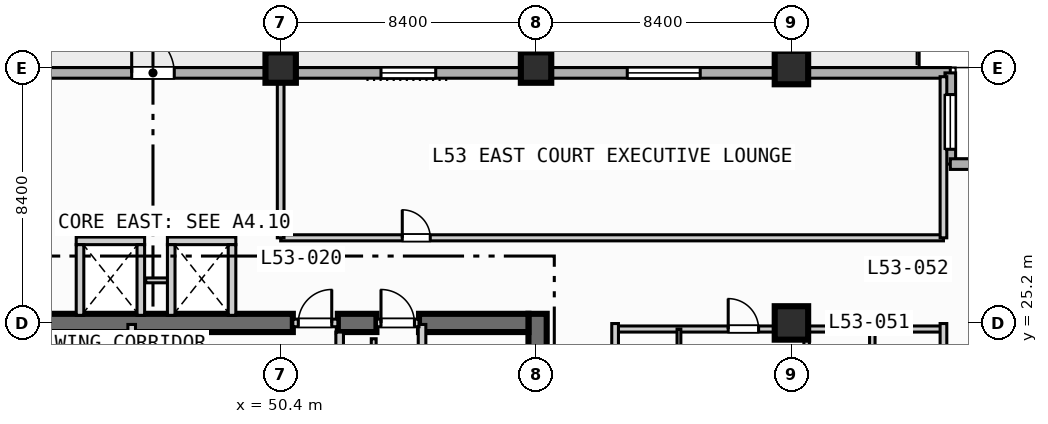
"""IFC4 building model, lengths in metres.
Left out: names, types, materials, properties, quantities, classifications, styles, units other than length and angle.
Written with IfcOpenShell. Run it as: python <this file> out.ifc"""

import sys

from ifc_helpers import new_model, si_unit, direction, frame, frame_2d, origin, origin_2d, place, context, subcontext, project, spatial, rectangle, extrude, element, fill, save


model = new_model("IFC4")
c1 = context("Model", 3, precision=1e-05, world=origin(), true_north=direction((0.0, 1.0)))
c2 = subcontext(c1, "Body", "Model", "MODEL_VIEW")
j1 = project(units=[si_unit("LENGTHUNIT", "METRE"), si_unit("PLANEANGLEUNIT", "RADIAN")], contexts=[c1])
p1 = place(None, origin())
s1 = spatial("IfcSite", under=j1, at=p1, CompositionType="ELEMENT")
p2 = place(p1, origin())
s2 = spatial("IfcBuilding", under=s1, at=p2, CompositionType="ELEMENT")
p3 = place(p2, frame((0.0, 0.0, 216.1)))
s3 = spatial("IfcBuildingStorey", under=s2, at=p3, CompositionType="ELEMENT", Elevation=216.1)
p4 = place(p3, frame((58.85, 20.5, 0.0), z_axis=(0.0, 0.0, 1.0), x_axis=(0.0, 1.0, 0.0)))
e1 = element("IfcWall", 1, at=p4, inside=s3, PredefinedType="SHEAR", context=c2, shape_type="SweptSolid", body=[
    extrude(rectangle(XDim=5.0, YDim=0.6, at=frame_2d((2.5, 0.0))), origin(), (0.0, 0.0, 1.0), 3.47),
])
p5 = place(p3, frame((42.2, 25.2, 0.0), z_axis=(0.0, 0.0, 1.0), x_axis=(1.0, 0.0, 0.0)))
e2 = element("IfcWall", 2, at=p5, inside=s3, PredefinedType="SHEAR", context=c2, shape_type="SweptSolid", body=[
    extrude(rectangle(XDim=8.6, YDim=0.6, at=frame_2d((4.3, 0.0))), origin(), (0.0, 0.0, 1.0), 3.47),
])
p6 = place(p3, frame((52.28, 25.2, 0.0), z_axis=(0.0, 0.0, 1.0), x_axis=(1.0, 0.0, 0.0)))
e3 = element("IfcWall", 3, at=p6, inside=s3, PredefinedType="SHEAR", context=c2, shape_type="SweptSolid", body=[
    extrude(rectangle(XDim=1.27, YDim=0.6, at=frame_2d((0.635, 0.0))), origin(), (0.0, 0.0, 1.0), 3.47),
])
p7 = place(p3, frame((54.95, 25.2, 0.0), z_axis=(0.0, 0.0, 1.0), x_axis=(1.0, 0.0, 0.0)))
e4 = element("IfcWall", 4, at=p7, inside=s3, PredefinedType="SHEAR", context=c2, shape_type="SweptSolid", body=[
    extrude(rectangle(XDim=3.6, YDim=0.6, at=frame_2d((1.8, 0.0))), origin(), (0.0, 0.0, 1.0), 3.47),
])
for number, where, z_axis, x_axis in (
    (5, (50.4, 33.6, 0.0), (0.0, 0.0, 1.0), (1.0, 0.0, 0.0)),
    (6, (58.8, 33.6, 0.0), (0.0, 0.0, 1.0), (1.0, 0.0, 0.0)),
):
    element("IfcColumn", number, at=place(p3, frame(where, z_axis=z_axis, x_axis=x_axis)), inside=s3, PredefinedType="COLUMN", context=c2, shape_type="SweptSolid", body=[
        extrude(rectangle(XDim=1.0, YDim=1.0, at=origin_2d()), origin(), (0.0, 0.0, 1.0), 3.7),
    ])
for number, where, z_axis, x_axis in (
    (7, (67.2, 25.2, 0.0), (0.0, 0.0, 1.0), (1.0, 0.0, 0.0)),
    (8, (67.2, 33.6, 0.0), (0.0, 0.0, 1.0), (1.0, 0.0, 0.0)),
):
    element("IfcColumn", number, at=place(p3, frame(where, z_axis=z_axis, x_axis=x_axis)), inside=s3, PredefinedType="COLUMN", context=c2, shape_type="SweptSolid", body=[
        extrude(rectangle(XDim=1.1, YDim=1.1, at=origin_2d()), origin(), (0.0, 0.0, 1.0), 3.7),
    ])
p8 = place(p3, frame((33.425, 33.425, 0.0), z_axis=(0.0, 0.0, 1.0), x_axis=(1.0, 0.0, 0.0)))
e9 = element("IfcWall", 9, at=p8, inside=s3, PredefinedType="STANDARD", context=c2, shape_type="SweptSolid", body=[
    extrude(rectangle(XDim=39.0, YDim=0.35, at=frame_2d((19.5, 0.0))), origin(), (0.0, 0.0, 1.0), 3.47),
])
p9 = place(p8, frame((12.075, 0.0, 0.0)))
e10 = element("IfcOpeningElement", 10, at=p9, cuts=e9, PredefinedType="OPENING", context=c2, shape_type="SweptSolid", body=[
    extrude(rectangle(XDim=1.4, YDim=2.2, at=frame_2d((0.7, 1.1))), frame((0.0, 0.185, 0.0), z_axis=(0.0, -1.0, 0.0), x_axis=(1.0, 0.0, 0.0)), (0.0, 0.0, 1.0), 0.37),
])
p10 = place(p8, frame((20.275, 0.0, 0.85)))
e11 = element("IfcOpeningElement", 11, at=p10, cuts=e9, PredefinedType="OPENING", context=c2, shape_type="SweptSolid", body=[
    extrude(rectangle(XDim=1.8, YDim=1.8, at=frame_2d((0.9, 0.9))), frame((0.0, 0.185, 0.0), z_axis=(0.0, -1.0, 0.0), x_axis=(1.0, 0.0, 0.0)), (0.0, 0.0, 1.0), 0.37),
])
p11 = place(p8, frame((28.375, 0.0, 0.85)))
e12 = element("IfcOpeningElement", 12, at=p11, cuts=e9, PredefinedType="OPENING", context=c2, shape_type="SweptSolid", body=[
    extrude(rectangle(XDim=2.4, YDim=1.95, at=frame_2d((1.2, 0.975))), frame((0.0, 0.185, 0.0), z_axis=(0.0, -1.0, 0.0), x_axis=(1.0, 0.0, 0.0)), (0.0, 0.0, 1.0), 0.37),
])
p12 = place(p3, frame((72.425, 33.425, 0.0), z_axis=(0.0, 0.0, 1.0), x_axis=(0.0, -1.0, 0.0)))
e13 = element("IfcWall", 13, at=p12, inside=s3, PredefinedType="STANDARD", context=c2, shape_type="SweptSolid", body=[
    extrude(rectangle(XDim=3.0, YDim=0.35, at=frame_2d((1.5, 0.0))), origin(), (0.0, 0.0, 1.0), 3.47),
])
p13 = place(p12, frame((0.712, 0.0, 0.85)))
e14 = element("IfcOpeningElement", 14, at=p13, cuts=e13, PredefinedType="OPENING", context=c2, shape_type="SweptSolid", body=[
    extrude(rectangle(XDim=1.8, YDim=1.8, at=frame_2d((0.9, 0.9))), frame((0.0, 0.185, 0.0), z_axis=(0.0, -1.0, 0.0), x_axis=(1.0, 0.0, 0.0)), (0.0, 0.0, 1.0), 0.37),
])
p14 = place(p3, frame((72.425, 30.425, 0.0), z_axis=(0.0, 0.0, 1.0), x_axis=(1.0, 0.0, 0.0)))
e15 = element("IfcWall", 15, at=p14, inside=s3, PredefinedType="STANDARD", context=c2, shape_type="SweptSolid", body=[
    extrude(rectangle(XDim=3.0, YDim=0.35, at=frame_2d((1.5, 0.0))), origin(), (0.0, 0.0, 1.0), 3.47),
])
p15 = place(p3, frame((45.5, 21.0, 0.0), z_axis=(0.0, 0.0, 1.0), x_axis=(0.0, 1.0, 0.0)))
e16 = element("IfcWall", 16, at=p15, inside=s3, PredefinedType="SOLIDWALL", context=c2, shape_type="SweptSolid", body=[
    extrude(rectangle(XDim=4.15, YDim=0.25, at=frame_2d((2.075, 0.0))), origin(), (0.0, 0.0, 1.0), 3.47),
])
p16 = place(p15, frame((0.65, 0.0, 0.0)))
e17 = element("IfcOpeningElement", 17, at=p16, cuts=e16, PredefinedType="OPENING", context=c2, shape_type="SweptSolid", body=[
    extrude(rectangle(XDim=1.1, YDim=2.15, at=frame_2d((0.55, 1.075))), frame((0.0, 0.135, 0.0), z_axis=(0.0, -1.0, 0.0), x_axis=(1.0, 0.0, 0.0)), (0.0, 0.0, 1.0), 0.27),
])
p17 = place(p3, frame((50.8, 25.2, 0.0), z_axis=(0.0, 0.0, 1.0), x_axis=(1.0, 0.0, 0.0)))
e18 = element("IfcWall", 18, at=p17, inside=s3, PredefinedType="SOLIDWALL", context=c2, shape_type="SweptSolid", body=[
    extrude(rectangle(XDim=1.48, YDim=0.25, at=frame_2d((0.74, 0.0))), origin(), (0.0, 0.0, 1.0), 3.47),
])
p18 = place(p17, frame((0.18, 0.0, 0.0)))
e19 = element("IfcOpeningElement", 19, at=p18, cuts=e18, PredefinedType="OPENING", context=c2, shape_type="SweptSolid", body=[
    extrude(rectangle(XDim=1.1, YDim=2.15, at=frame_2d((0.55, 1.075))), frame((0.0, 0.135, 0.0), z_axis=(0.0, -1.0, 0.0), x_axis=(1.0, 0.0, 0.0)), (0.0, 0.0, 1.0), 0.27),
])
p19 = place(p3, frame((52.34, 21.0, 0.0), z_axis=(0.0, 0.0, 1.0), x_axis=(0.0, 1.0, 0.0)))
e20 = element("IfcWall", 20, at=p19, inside=s3, PredefinedType="SOLIDWALL", context=c2, shape_type="SweptSolid", body=[
    extrude(rectangle(XDim=3.9, YDim=0.25, at=frame_2d((1.95, 0.0))), origin(), (0.0, 0.0, 1.0), 3.47),
])
p20 = place(p3, frame((55.05, 21.0, 0.0), z_axis=(0.0, 0.0, 1.0), x_axis=(0.0, 1.0, 0.0)))
e21 = element("IfcWall", 21, at=p20, inside=s3, PredefinedType="SOLIDWALL", context=c2, shape_type="SweptSolid", body=[
    extrude(rectangle(XDim=4.15, YDim=0.25, at=frame_2d((2.075, 0.0))), origin(), (0.0, 0.0, 1.0), 3.47),
])
p21 = place(p20, frame((1.85, 0.0, 0.0)))
e22 = element("IfcOpeningElement", 22, at=p21, cuts=e21, PredefinedType="OPENING", context=c2, shape_type="SweptSolid", body=[
    extrude(rectangle(XDim=1.1, YDim=2.15, at=frame_2d((0.55, 1.075))), frame((0.0, 0.135, 0.0), z_axis=(0.0, -1.0, 0.0), x_axis=(1.0, 0.0, 0.0)), (0.0, 0.0, 1.0), 0.27),
])
p22 = place(p3, frame((53.55, 25.2, 0.0), z_axis=(0.0, 0.0, 1.0), x_axis=(1.0, 0.0, 0.0)))
e23 = element("IfcWall", 23, at=p22, inside=s3, PredefinedType="SOLIDWALL", context=c2, shape_type="SweptSolid", body=[
    extrude(rectangle(XDim=1.4, YDim=0.25, at=frame_2d((0.7, 0.0))), origin(), (0.0, 0.0, 1.0), 3.47),
])
p23 = place(p22, frame((0.15, 0.0, 0.0)))
e24 = element("IfcOpeningElement", 24, at=p23, cuts=e23, PredefinedType="OPENING", context=c2, shape_type="SweptSolid", body=[
    extrude(rectangle(XDim=1.1, YDim=2.15, at=frame_2d((0.55, 1.075))), frame((0.0, 0.135, 0.0), z_axis=(0.0, -1.0, 0.0), x_axis=(1.0, 0.0, 0.0)), (0.0, 0.0, 1.0), 0.27),
])
p24 = place(p3, frame((53.46, 22.32, 0.0), z_axis=(0.0, 0.0, 1.0), x_axis=(0.0, 1.0, 0.0)))
e25 = element("IfcWall", 25, at=p24, inside=s3, PredefinedType="PARTITIONING", context=c2, shape_type="SweptSolid", body=[
    extrude(rectangle(XDim=2.36, YDim=0.16, at=frame_2d((1.18, 0.0))), origin(), (0.0, 0.0, 1.0), 3.47),
])
p25 = place(p24, frame((0.16, 0.0, 0.0)))
e26 = element("IfcOpeningElement", 26, at=p25, cuts=e25, PredefinedType="OPENING", context=c2, shape_type="SweptSolid", body=[
    extrude(rectangle(XDim=0.9, YDim=2.1, at=frame_2d((0.45, 1.05))), frame((0.0, 0.09, 0.0), z_axis=(0.0, -1.0, 0.0), x_axis=(1.0, 0.0, 0.0)), (0.0, 0.0, 1.0), 0.18),
])
p26 = place(p3, frame((43.675, 27.9, 0.0), z_axis=(0.0, 0.0, 1.0), x_axis=(1.0, 0.0, 0.0)))
e27 = element("IfcWall", 27, at=p26, inside=s3, PredefinedType="SOLIDWALL", context=c2, shape_type="SweptSolid", body=[
    extrude(rectangle(XDim=2.25, YDim=0.25, at=frame_2d((1.125, 0.0))), origin(), (0.0, 0.0, 1.0), 3.47),
])
for number, where, z_axis, x_axis in (
    (28, (43.8, 25.45, 0.0), (0.0, 0.0, 1.0), (0.0, 1.0, 0.0)),
    (29, (45.8, 25.45, 0.0), (0.0, 0.0, 1.0), (0.0, 1.0, 0.0)),
):
    element("IfcWall", number, at=place(p3, frame(where, z_axis=z_axis, x_axis=x_axis)), inside=s3, PredefinedType="SOLIDWALL", context=c2, shape_type="SweptSolid", body=[
        extrude(rectangle(XDim=2.325, YDim=0.25, at=frame_2d((1.163, 0.0))), origin(), (0.0, 0.0, 1.0), 3.47),
    ])
p27 = place(p3, frame((45.96, 26.6, 0.0), z_axis=(0.0, 0.0, 1.0), x_axis=(1.0, 0.0, 0.0)))
e30 = element("IfcWall", 30, at=p27, inside=s3, PredefinedType="PARTITIONING", context=c2, shape_type="SweptSolid", body=[
    extrude(rectangle(XDim=0.88, YDim=0.16, at=frame_2d((0.44, 0.0))), origin(), (0.0, 0.0, 1.0), 3.47),
])
p28 = place(p3, frame((46.675, 27.9, 0.0), z_axis=(0.0, 0.0, 1.0), x_axis=(1.0, 0.0, 0.0)))
e31 = element("IfcWall", 31, at=p28, inside=s3, PredefinedType="SOLIDWALL", context=c2, shape_type="SweptSolid", body=[
    extrude(rectangle(XDim=2.25, YDim=0.25, at=frame_2d((1.125, 0.0))), origin(), (0.0, 0.0, 1.0), 3.47),
])
for number, where, z_axis, x_axis in (
    (32, (46.8, 25.45, 0.0), (0.0, 0.0, 1.0), (0.0, 1.0, 0.0)),
    (33, (48.8, 25.45, 0.0), (0.0, 0.0, 1.0), (0.0, 1.0, 0.0)),
):
    element("IfcWall", number, at=place(p3, frame(where, z_axis=z_axis, x_axis=x_axis)), inside=s3, PredefinedType="SOLIDWALL", context=c2, shape_type="SweptSolid", body=[
        extrude(rectangle(XDim=2.325, YDim=0.25, at=frame_2d((1.163, 0.0))), origin(), (0.0, 0.0, 1.0), 3.47),
    ])
p29 = place(p3, frame((61.4, 25.0, 0.0), z_axis=(0.0, 0.0, 1.0), x_axis=(1.0, 0.0, 0.0)))
e34 = element("IfcWall", 34, at=p29, inside=s3, PredefinedType="PARTITIONING", context=c2, shape_type="SweptSolid", body=[
    extrude(rectangle(XDim=10.8, YDim=0.2, at=frame_2d((5.4, 0.0))), origin(), (0.0, 0.0, 1.0), 2.82),
])
p30 = place(p29, frame((3.72, 0.0, 0.0)))
e35 = element("IfcOpeningElement", 35, at=p30, cuts=e34, PredefinedType="OPENING", context=c2, shape_type="SweptSolid", body=[
    extrude(rectangle(XDim=1.0, YDim=2.15, at=frame_2d((0.5, 1.075))), frame((0.0, 0.11, 0.0), z_axis=(0.0, -1.0, 0.0), x_axis=(1.0, 0.0, 0.0)), (0.0, 0.0, 1.0), 0.22),
])
for number, where, z_axis, x_axis in (
    (36, (61.4, 0.2, 0.0), (0.0, 0.0, 1.0), (0.0, 1.0, 0.0)),
    (37, (72.2, 0.2, 0.0), (0.0, 0.0, 1.0), (0.0, 1.0, 0.0)),
):
    element("IfcWall", number, at=place(p3, frame(where, z_axis=z_axis, x_axis=x_axis)), inside=s3, PredefinedType="PARTITIONING", context=c2, shape_type="SweptSolid", body=[
        extrude(rectangle(XDim=24.98, YDim=0.22, at=frame_2d((12.49, 0.0))), origin(), (0.0, 0.0, 1.0), 3.47),
    ])
for number, where, z_axis, x_axis in (
    (38, (67.7, 22.55, 0.0), (0.0, 0.0, 1.0), (0.0, 1.0, 0.0)),
    (39, (69.86, 22.55, 0.0), (0.0, 0.0, 1.0), (0.0, 1.0, 0.0)),
):
    element("IfcWall", number, at=place(p3, frame(where, z_axis=z_axis, x_axis=x_axis)), inside=s3, PredefinedType="PLUMBINGWALL", context=c2, shape_type="SweptSolid", body=[
        extrude(rectangle(XDim=2.45, YDim=0.18, at=frame_2d((1.225, 0.0))), origin(), (0.0, 0.0, 1.0), 3.47),
    ])
p31 = place(p3, frame((63.5, 0.35, 0.0), z_axis=(0.0, 0.0, 1.0), x_axis=(0.0, 1.0, 0.0)))
e40 = element("IfcWall", 40, at=p31, inside=s3, PredefinedType="PARTITIONING", context=c2, shape_type="SweptSolid", body=[
    extrude(rectangle(XDim=24.65, YDim=0.125, at=frame_2d((12.325, 0.0))), origin(), (0.0, 0.0, 1.0), 3.47),
])
p32 = place(p31, frame((10.64, 0.0, 0.0)))
e41 = element("IfcOpeningElement", 41, at=p32, cuts=e40, PredefinedType="OPENING", context=c2, shape_type="SweptSolid", body=[
    extrude(rectangle(XDim=0.92, YDim=2.1, at=frame_2d((0.46, 1.05))), frame((0.0, 0.073, 0.0), z_axis=(0.0, -1.0, 0.0), x_axis=(1.0, 0.0, 0.0)), (0.0, 0.0, 1.0), 0.145),
])
p33 = place(p3, frame((50.4, 28.0, 0.0), z_axis=(0.0, 0.0, 1.0), x_axis=(1.0, 0.0, 0.0)))
e42 = element("IfcWall", 42, at=p33, inside=s3, PredefinedType="PARTITIONING", context=c2, shape_type="SweptSolid", body=[
    extrude(rectangle(XDim=21.8, YDim=0.2, at=frame_2d((10.9, 0.0))), origin(), (0.0, 0.0, 1.0), 3.47),
])
p34 = place(p33, frame((4.0, 0.0, 0.0)))
e43 = element("IfcOpeningElement", 43, at=p34, cuts=e42, PredefinedType="OPENING", context=c2, shape_type="SweptSolid", body=[
    extrude(rectangle(XDim=0.92, YDim=2.1, at=frame_2d((0.46, 1.05))), frame((0.0, 0.11, 0.0), z_axis=(0.0, -1.0, 0.0), x_axis=(1.0, 0.0, 0.0)), (0.0, 0.0, 1.0), 0.22),
])
p35 = place(p3, frame((50.4, 28.0, 0.0), z_axis=(0.0, 0.0, 1.0), x_axis=(0.0, 1.0, 0.0)))
e44 = element("IfcWall", 44, at=p35, inside=s3, PredefinedType="PARTITIONING", context=c2, shape_type="SweptSolid", body=[
    extrude(rectangle(XDim=5.3, YDim=0.22, at=frame_2d((2.65, 0.0))), origin(), (0.0, 0.0, 1.0), 3.007),
])
p36 = place(p3, frame((72.2, 28.0, 0.0), z_axis=(0.0, 0.0, 1.0), x_axis=(0.0, 1.0, 0.0)))
e45 = element("IfcWall", 45, at=p36, inside=s3, PredefinedType="PARTITIONING", context=c2, shape_type="SweptSolid", body=[
    extrude(rectangle(XDim=5.3, YDim=0.22, at=frame_2d((2.65, 0.0))), origin(), (0.0, 0.0, 1.0), 3.47),
])
p37 = place(p9, origin())
e46 = element("IfcDoor", 46, at=p37, inside=s3, OperationType="SINGLE_SWING_LEFT", PredefinedType="DOOR", context=c2, shape_type="SweptSolid", body=[
    extrude(rectangle(XDim=1.4, YDim=2.2, at=frame_2d((0.7, 1.1))), frame((0.0, 0.025, 0.0), z_axis=(0.0, -1.0, 0.0), x_axis=(1.0, 0.0, 0.0)), (0.0, 0.0, 1.0), 0.05),
])
fill(e10, e46)
p38 = place(p10, origin())
e47 = element("IfcWindow", 47, at=p38, inside=s3, PartitioningType="SINGLE_PANEL", PredefinedType="WINDOW", context=c2, shape_type="SweptSolid", body=[
    extrude(rectangle(XDim=1.8, YDim=1.8, at=frame_2d((0.9, 0.9))), frame((0.0, 0.03, 0.0), z_axis=(0.0, -1.0, 0.0), x_axis=(1.0, 0.0, 0.0)), (0.0, 0.0, 1.0), 0.06),
])
fill(e11, e47)
p39 = place(p11, origin())
e48 = element("IfcWindow", 48, at=p39, inside=s3, PartitioningType="SINGLE_PANEL", PredefinedType="WINDOW", context=c2, shape_type="SweptSolid", body=[
    extrude(rectangle(XDim=2.4, YDim=1.95, at=frame_2d((1.2, 0.975))), frame((0.0, 0.03, 0.0), z_axis=(0.0, -1.0, 0.0), x_axis=(1.0, 0.0, 0.0)), (0.0, 0.0, 1.0), 0.06),
])
fill(e12, e48)
p40 = place(p13, origin())
e49 = element("IfcWindow", 49, at=p40, inside=s3, PartitioningType="SINGLE_PANEL", PredefinedType="WINDOW", context=c2, shape_type="SweptSolid", body=[
    extrude(rectangle(XDim=1.8, YDim=1.8, at=frame_2d((0.9, 0.9))), frame((0.0, 0.03, 0.0), z_axis=(0.0, -1.0, 0.0), x_axis=(1.0, 0.0, 0.0)), (0.0, 0.0, 1.0), 0.06),
])
fill(e14, e49)
p41 = place(p18, origin())
e50 = element("IfcDoor", 50, at=p41, inside=s3, OperationType="SINGLE_SWING_RIGHT", PredefinedType="DOOR", context=c2, shape_type="SweptSolid", body=[
    extrude(rectangle(XDim=1.1, YDim=2.15, at=frame_2d((0.55, 1.075))), frame((0.0, 0.025, 0.0), z_axis=(0.0, -1.0, 0.0), x_axis=(1.0, 0.0, 0.0)), (0.0, 0.0, 1.0), 0.05),
])
fill(e19, e50)
p42 = place(p23, origin())
e51 = element("IfcDoor", 51, at=p42, inside=s3, OperationType="SINGLE_SWING_LEFT", PredefinedType="DOOR", context=c2, shape_type="SweptSolid", body=[
    extrude(rectangle(XDim=1.1, YDim=2.15, at=frame_2d((0.55, 1.075))), frame((0.0, 0.025, 0.0), z_axis=(0.0, -1.0, 0.0), x_axis=(1.0, 0.0, 0.0)), (0.0, 0.0, 1.0), 0.05),
])
fill(e24, e51)
p43 = place(p30, origin())
e52 = element("IfcDoor", 52, at=p43, inside=s3, OperationType="SINGLE_SWING_LEFT", PredefinedType="DOOR", context=c2, shape_type="SweptSolid", body=[
    extrude(rectangle(XDim=1.0, YDim=2.15, at=frame_2d((0.5, 1.075))), frame((0.0, 0.025, 0.0), z_axis=(0.0, -1.0, 0.0), x_axis=(1.0, 0.0, 0.0)), (0.0, 0.0, 1.0), 0.05),
])
fill(e35, e52)
p44 = place(p34, origin())
e53 = element("IfcDoor", 53, at=p44, inside=s3, OperationType="SINGLE_SWING_LEFT", PredefinedType="DOOR", context=c2, shape_type="SweptSolid", body=[
    extrude(rectangle(XDim=0.92, YDim=2.1, at=frame_2d((0.46, 1.05))), frame((0.0, 0.025, 0.0), z_axis=(0.0, -1.0, 0.0), x_axis=(1.0, 0.0, 0.0)), (0.0, 0.0, 1.0), 0.05),
])
fill(e43, e53)
save(model, sys.argv[1])
